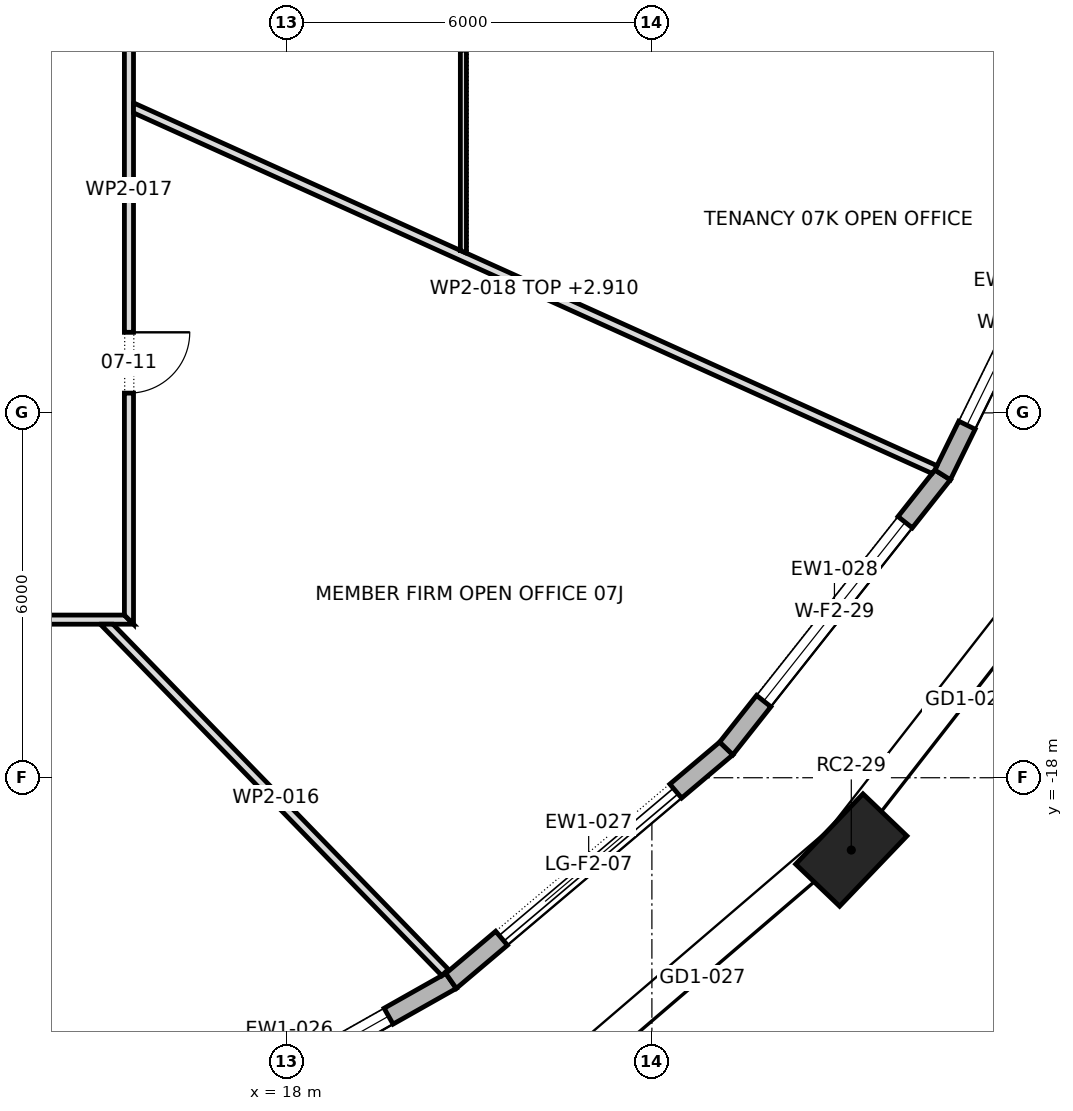
"""IFC4 building model, lengths in metres.
Left out: names, types, materials, properties, quantities, classifications, styles, units other than length and angle.
Written with IfcOpenShell. Run it as: python <this file> out.ifc"""

import sys

from ifc_helpers import new_model, si_unit, direction, frame, frame_2d, origin, origin_2d, place, context, subcontext, project, spatial, polyline, rectangle, outline, extrude, element, fill, save


model = new_model("IFC4")
c1 = context("Model", 3, precision=1e-05, world=origin(), true_north=direction((0.0, 1.0)))
c2 = subcontext(c1, "Body", "Model", "MODEL_VIEW")
j1 = project(units=[si_unit("LENGTHUNIT", "METRE"), si_unit("PLANEANGLEUNIT", "RADIAN")], contexts=[c1])
p1 = place(None, origin())
s1 = spatial("IfcSite", under=j1, at=p1, CompositionType="ELEMENT")
p2 = place(p1, origin())
s2 = spatial("IfcBuilding", under=s1, at=p2, CompositionType="ELEMENT")
p3 = place(p2, frame((0.0, 0.0, 104.5)))
s3 = spatial("IfcBuildingStorey", under=s2, at=p3, CompositionType="ELEMENT", Elevation=104.5)
p4 = place(p3, frame((27.279, -19.189, 0.0), z_axis=(0.0, 0.0, 1.0), x_axis=(0.69158113391, 0.722298785282, 0.0)))
e1 = element("IfcColumn", 1, at=p4, inside=s3, PredefinedType="COLUMN", context=c2, shape_type="SweptSolid", body=[
    extrude(rectangle(XDim=1.6, YDim=1.0, at=origin_2d()), origin(), (0.0, 0.0, 1.0), 4.2),
])
p5 = place(p3, frame((15.377, -24.344, 0.0), z_axis=(0.0, 0.0, 1.0), x_axis=(0.870828448417, 0.491587035455, 0.0)))
e2 = element("IfcWall", 2, at=p5, inside=s3, PredefinedType="STANDARD", context=c2, shape_type="SweptSolid", body=[
    extrude(outline(polyline([(-0.013, -0.15), (6.123, -0.15), (6.094, 0.15), (0.013, 0.15), (-0.013, -0.15)])), origin(), (0.0, 0.0, 1.0), 3.9),
])
p6 = place(p5, frame((1.179, 0.0, 0.6)))
e3 = element("IfcOpeningElement", 3, at=p6, cuts=e2, PredefinedType="OPENING", context=c2, shape_type="SweptSolid", body=[
    extrude(rectangle(XDim=3.75, YDim=2.85, at=frame_2d((1.875, 1.425))), frame((0.0, 0.162, 0.0), z_axis=(0.0, -1.0, 0.0), x_axis=(1.0, 0.0, 0.0)), (0.0, 0.0, 1.0), 0.324),
])
p7 = place(p3, frame((20.697, -21.341, 0.0), z_axis=(0.0, 0.0, 1.0), x_axis=(0.763894031266, 0.645341699409, 0.0)))
e4 = element("IfcWall", 4, at=p7, inside=s3, PredefinedType="STANDARD", context=c2, shape_type="SweptSolid", body=[
    extrude(outline(polyline([(-0.014, -0.15), (5.94, -0.15), (5.91, 0.15), (0.014, 0.15), (-0.014, -0.15)])), origin(), (0.0, 0.0, 1.0), 3.9),
])
p8 = place(p7, frame((1.087, 0.0, 0.0)))
e5 = element("IfcOpeningElement", 5, at=p8, cuts=e4, PredefinedType="OPENING", context=c2, shape_type="SweptSolid", body=[
    extrude(rectangle(XDim=3.75, YDim=3.45, at=frame_2d((1.875, 1.725))), frame((0.0, 0.162, 0.0), z_axis=(0.0, -1.0, 0.0), x_axis=(1.0, 0.0, 0.0)), (0.0, 0.0, 1.0), 0.324),
])
p9 = place(p3, frame((25.223, -17.518, 0.0), z_axis=(0.0, 0.0, 1.0), x_axis=(0.620329992039, 0.784340934146, 0.0)))
e6 = element("IfcWall", 6, at=p9, inside=s3, PredefinedType="STANDARD", context=c2, shape_type="SweptSolid", body=[
    extrude(outline(polyline([(-0.015, -0.15), (5.751, -0.15), (5.719, 0.15), (0.015, 0.15), (-0.015, -0.15)])), origin(), (0.0, 0.0, 1.0), 3.9),
])
p10 = place(p9, frame((0.993, 0.0, 0.6)))
e7 = element("IfcOpeningElement", 7, at=p10, cuts=e6, PredefinedType="OPENING", context=c2, shape_type="SweptSolid", body=[
    extrude(rectangle(XDim=3.75, YDim=2.85, at=frame_2d((1.875, 1.425))), frame((0.0, 0.162, 0.0), z_axis=(0.0, -1.0, 0.0), x_axis=(1.0, 0.0, 0.0)), (0.0, 0.0, 1.0), 0.324),
])
p11 = place(p3, frame((28.781, -13.019, 0.0), z_axis=(0.0, 0.0, 1.0), x_axis=(0.440238988749, 0.897880633929, 0.0)))
e8 = element("IfcWall", 8, at=p11, inside=s3, PredefinedType="STANDARD", context=c2, shape_type="SweptSolid", body=[
    extrude(outline(polyline([(-0.016, -0.15), (5.586, -0.15), (5.553, 0.15), (0.016, 0.15), (-0.016, -0.15)])), origin(), (0.0, 0.0, 1.0), 3.9),
])
p12 = place(p11, frame((0.91, 0.0, 0.6)))
e9 = element("IfcOpeningElement", 9, at=p12, cuts=e8, PredefinedType="OPENING", context=c2, shape_type="SweptSolid", body=[
    extrude(rectangle(XDim=3.75, YDim=2.85, at=frame_2d((1.875, 1.425))), frame((0.0, 0.162, 0.0), z_axis=(0.0, -1.0, 0.0), x_axis=(1.0, 0.0, 0.0)), (0.0, 0.0, 1.0), 0.324),
])
p13 = place(p3, frame((-15.475, -15.4, 0.0), z_axis=(0.0, 0.0, 1.0), x_axis=(1.0, 0.0, 0.0)))
e10 = element("IfcWall", 10, at=p13, inside=s3, PredefinedType="PARTITIONING", context=c2, shape_type="SweptSolid", body=[
    extrude(outline(polyline([(0.0, -0.075), (1.935, -0.075), (3.869, -0.075), (5.803, -0.075), (7.738, -0.075), (9.672, -0.075), (11.606, -0.075), (13.541, -0.075), (15.475, -0.075), (17.409, -0.075), (19.344, -0.075), (21.278, -0.075), (23.212, -0.075), (25.147, -0.075), (27.081, -0.075), (29.016, -0.075), (30.95, -0.075), (30.8, 0.075), (28.885, 0.075), (26.969, 0.075), (25.053, 0.075), (23.138, 0.075), (21.222, 0.075), (19.306, 0.075), (17.391, 0.075), (15.475, 0.075), (13.56, 0.075), (11.644, 0.075), (9.728, 0.075), (7.812, 0.075), (5.897, 0.075), (3.981, 0.075), (2.066, 0.075), (0.15, 0.075), (0.0, -0.075)])), origin(), (0.0, 0.0, 1.0), 3.9),
])
p14 = place(p13, frame((2.405, 0.0, 0.0)))
e11 = element("IfcOpeningElement", 11, at=p14, cuts=e10, PredefinedType="OPENING", context=c2, shape_type="SweptSolid", body=[
    extrude(rectangle(XDim=1.0, YDim=2.1, at=frame_2d((0.5, 1.05))), frame((0.0, 0.087, 0.0), z_axis=(0.0, -1.0, 0.0), x_axis=(1.0, 0.0, 0.0)), (0.0, 0.0, 1.0), 0.174),
])
p15 = place(p13, frame((10.605, 0.0, 0.0)))
e12 = element("IfcOpeningElement", 12, at=p15, cuts=e10, PredefinedType="OPENING", context=c2, shape_type="SweptSolid", body=[
    extrude(rectangle(XDim=1.8, YDim=2.1, at=frame_2d((0.9, 1.05))), frame((0.0, 0.087, 0.0), z_axis=(0.0, -1.0, 0.0), x_axis=(1.0, 0.0, 0.0)), (0.0, 0.0, 1.0), 0.174),
])
p16 = place(p13, frame((22.955, 0.0, 0.0)))
e13 = element("IfcOpeningElement", 13, at=p16, cuts=e10, PredefinedType="OPENING", context=c2, shape_type="SweptSolid", body=[
    extrude(rectangle(XDim=1.8, YDim=2.1, at=frame_2d((0.9, 1.05))), frame((0.0, 0.087, 0.0), z_axis=(0.0, -1.0, 0.0), x_axis=(1.0, 0.0, 0.0)), (0.0, 0.0, 1.0), 0.174),
])
p17 = place(p3, frame((14.982, -15.423, 0.0), z_axis=(0.0, 0.0, 1.0), x_axis=(0.696915710248, -0.717153046992, 0.0)))
e14 = element("IfcWall", 14, at=p17, inside=s3, PredefinedType="PARTITIONING", context=c2, shape_type="SweptSolid", body=[
    extrude(outline(polyline([(8.059, 0.075), (6.08, 0.075), (4.102, 0.075), (2.124, 0.075), (0.146, 0.075), (0.0, -0.075), (0.0, -0.075), (1.612, -0.075), (3.223, -0.075), (4.835, -0.075), (6.447, -0.075), (8.059, -0.075), (8.059, 0.075)])), origin(), (0.0, 0.0, 1.0), 3.9),
])
p18 = place(p3, frame((15.4, -15.475, 0.0), z_axis=(0.0, 0.0, 1.0), x_axis=(0.0, 1.0, 0.0)))
e15 = element("IfcWall", 15, at=p18, inside=s3, PredefinedType="PARTITIONING", context=c2, shape_type="SweptSolid", body=[
    extrude(outline(polyline([(14.195, 0.075), (12.439, 0.075), (10.684, 0.075), (8.928, 0.075), (7.173, 0.075), (5.417, 0.075), (3.661, 0.075), (1.906, 0.075), (0.15, 0.075), (0.0, -0.075), (1.775, -0.075), (3.549, -0.075), (5.323, -0.075), (7.098, -0.075), (8.872, -0.075), (10.646, -0.075), (12.421, -0.075), (14.195, -0.075), (14.195, 0.075)])), origin(), (0.0, 0.0, 1.0), 3.9),
])
p19 = place(p18, frame((3.8, 0.0, 0.0)))
e16 = element("IfcOpeningElement", 16, at=p19, cuts=e15, PredefinedType="OPENING", context=c2, shape_type="SweptSolid", body=[
    extrude(rectangle(XDim=1.0, YDim=2.1, at=frame_2d((0.5, 1.05))), frame((0.0, 0.087, 0.0), z_axis=(0.0, -1.0, 0.0), x_axis=(1.0, 0.0, 0.0)), (0.0, 0.0, 1.0), 0.174),
])
p20 = place(p18, frame((10.86, 0.0, 0.0)))
e17 = element("IfcOpeningElement", 17, at=p20, cuts=e15, PredefinedType="OPENING", context=c2, shape_type="SweptSolid", body=[
    extrude(rectangle(XDim=1.0, YDim=2.1, at=frame_2d((0.5, 1.05))), frame((0.0, 0.087, 0.0), z_axis=(0.0, -1.0, 0.0), x_axis=(1.0, 0.0, 0.0)), (0.0, 0.0, 1.0), 0.174),
])
p21 = place(p3, frame((15.444, -6.97, 0.0), z_axis=(0.0, 0.0, 1.0), x_axis=(0.911385678544, -0.411553331835, 0.0)))
e18 = element("IfcWall", 18, at=p21, inside=s3, PredefinedType="PARTITIONING", context=c2, shape_type="SweptSolid", body=[
    extrude(outline(polyline([(0.068, -0.075), (1.869, -0.075), (3.67, -0.075), (5.471, -0.075), (7.272, -0.075), (9.074, -0.075), (10.875, -0.075), (12.676, -0.075), (14.477, -0.075), (14.495, -0.004), (14.497, 0.058), (14.497, 0.075), (12.778, 0.075), (11.058, 0.075), (9.339, 0.075), (7.62, 0.075), (5.9, 0.075), (5.898, 0.074), (5.898, 0.075), (3.932, 0.075), (1.966, 0.075), (0.0, 0.075), (0.068, -0.075)])), origin(), (0.0, 0.0, 1.0), 2.91),
])
p22 = place(p3, frame((20.9, -1.811, 0.0), z_axis=(0.0, 0.0, 1.0), x_axis=(0.0, -1.0, 0.0)))
e19 = element("IfcWall", 19, at=p22, inside=s3, PredefinedType="PARTITIONING", context=c2, shape_type="SweptSolid", body=[
    extrude(outline(polyline([(0.0, -0.05), (1.879, -0.05), (3.759, -0.05), (5.638, -0.05), (7.518, -0.05), (7.562, 0.049), (7.562, 0.05), (5.674, 0.05), (3.785, 0.05), (1.897, 0.05), (0.008, 0.05), (0.0, -0.047), (0.0, -0.05)])), origin(), (0.0, 0.0, 1.0), 3.9),
])
p23 = place(p22, frame((3.324, 0.0, 0.0)))
e20 = element("IfcOpeningElement", 20, at=p23, cuts=e19, PredefinedType="OPENING", context=c2, shape_type="SweptSolid", body=[
    extrude(rectangle(XDim=0.9, YDim=2.1, at=frame_2d((0.45, 1.05))), frame((0.0, 0.062, 0.0), z_axis=(0.0, -1.0, 0.0), x_axis=(1.0, 0.0, 0.0)), (0.0, 0.0, 1.0), 0.124),
])
p24 = place(p6, origin())
e21 = element("IfcWindow", 21, at=p24, inside=s3, PartitioningType="TRIPLE_PANEL_VERTICAL", PredefinedType="WINDOW", context=c2, shape_type="SweptSolid", body=[
    extrude(rectangle(XDim=3.75, YDim=2.85, at=frame_2d((1.875, 1.425))), frame((0.0, 0.03, 0.0), z_axis=(0.0, -1.0, 0.0), x_axis=(1.0, 0.0, 0.0)), (0.0, 0.0, 1.0), 0.06),
])
fill(e3, e21)
p25 = place(p8, origin())
e22 = element("IfcDoor", 22, at=p25, inside=s3, OperationType="DOUBLE_DOOR_SLIDING", PredefinedType="DOOR", context=c2, shape_type="SweptSolid", body=[
    extrude(rectangle(XDim=3.75, YDim=3.45, at=frame_2d((1.875, 1.725))), frame((0.0, 0.025, 0.0), z_axis=(0.0, -1.0, 0.0), x_axis=(1.0, 0.0, 0.0)), (0.0, 0.0, 1.0), 0.05),
])
fill(e5, e22)
p26 = place(p10, origin())
e23 = element("IfcWindow", 23, at=p26, inside=s3, PartitioningType="TRIPLE_PANEL_VERTICAL", PredefinedType="WINDOW", context=c2, shape_type="SweptSolid", body=[
    extrude(rectangle(XDim=3.75, YDim=2.85, at=frame_2d((1.875, 1.425))), frame((0.0, 0.03, 0.0), z_axis=(0.0, -1.0, 0.0), x_axis=(1.0, 0.0, 0.0)), (0.0, 0.0, 1.0), 0.06),
])
fill(e7, e23)
p27 = place(p12, origin())
e24 = element("IfcWindow", 24, at=p27, inside=s3, PartitioningType="TRIPLE_PANEL_VERTICAL", PredefinedType="WINDOW", context=c2, shape_type="SweptSolid", body=[
    extrude(rectangle(XDim=3.75, YDim=2.85, at=frame_2d((1.875, 1.425))), frame((0.0, 0.03, 0.0), z_axis=(0.0, -1.0, 0.0), x_axis=(1.0, 0.0, 0.0)), (0.0, 0.0, 1.0), 0.06),
])
fill(e9, e24)
p28 = place(p19, frame((1.0, 0.0, 0.0), z_axis=(0.0, 0.0, 1.0), x_axis=(-1.0, 0.0, 0.0)))
e25 = element("IfcDoor", 25, at=p28, inside=s3, OperationType="SINGLE_SWING_RIGHT", PredefinedType="DOOR", context=c2, shape_type="SweptSolid", body=[
    extrude(rectangle(XDim=1.0, YDim=2.1, at=frame_2d((0.5, 1.05))), frame((0.0, 0.025, 0.0), z_axis=(0.0, -1.0, 0.0), x_axis=(1.0, 0.0, 0.0)), (0.0, 0.0, 1.0), 0.05),
])
fill(e16, e25)
save(model, sys.argv[1])
